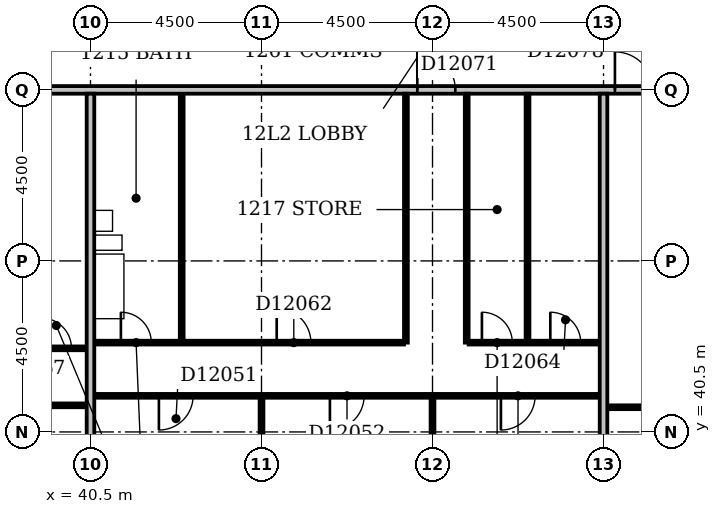
"""IFC4 building model, lengths in metres.
Left out: names, types, materials, properties, quantities, classifications, styles, units other than length and angle.
Written with IfcOpenShell. Run it as: python <this file> out.ifc"""

import sys

from ifc_helpers import new_model, si_unit, direction, frame, frame_2d, origin, place, context, subcontext, project, spatial, rectangle, extrude, element, fill, save


model = new_model("IFC4")
c1 = context("Model", 3, precision=1e-05, world=origin(), true_north=direction((0.0, 1.0)))
c2 = subcontext(c1, "Body", "Model", "MODEL_VIEW")
j1 = project(units=[si_unit("LENGTHUNIT", "METRE"), si_unit("PLANEANGLEUNIT", "RADIAN")], contexts=[c1])
p1 = place(None, origin())
s1 = spatial("IfcSite", under=j1, at=p1, CompositionType="ELEMENT")
p2 = place(p1, origin())
s2 = spatial("IfcBuilding", under=s1, at=p2, CompositionType="ELEMENT")
p3 = place(p2, frame((0.0, 0.0, 54.2)))
s3 = spatial("IfcBuildingStorey", under=s2, at=p3, CompositionType="ELEMENT", Elevation=54.2)
p4 = place(p3, frame((40.5, 36.6, 0.0), z_axis=(0.0, 0.0, 1.0), x_axis=(0.0, 1.0, 0.0)))
e1 = element("IfcWall", 1, at=p4, inside=s3, PredefinedType="PARTITIONING", context=c2, shape_type="SweptSolid", body=[
    extrude(rectangle(XDim=12.8, YDim=0.2, at=frame_2d((6.4, 0.0))), origin(), (0.0, 0.0, 1.0), 3.3),
])
p5 = place(p3, frame((45.0, 36.6, 0.0), z_axis=(0.0, 0.0, 1.0), x_axis=(0.0, 1.0, 0.0)))
e2 = element("IfcWall", 2, at=p5, inside=s3, PredefinedType="PARTITIONING", context=c2, shape_type="SweptSolid", body=[
    extrude(rectangle(XDim=4.8, YDim=0.1, at=frame_2d((2.4, 0.0))), origin(), (0.0, 0.0, 1.0), 2.6),
])
p6 = place(p3, frame((49.5, 36.6, 0.0), z_axis=(0.0, 0.0, 1.0), x_axis=(0.0, 1.0, 0.0)))
e3 = element("IfcWall", 3, at=p6, inside=s3, PredefinedType="PARTITIONING", context=c2, shape_type="SweptSolid", body=[
    extrude(rectangle(XDim=4.8, YDim=0.1, at=frame_2d((2.4, 0.0))), origin(), (0.0, 0.0, 1.0), 3.3),
])
p7 = place(p3, frame((54.0, 36.6, 0.0), z_axis=(0.0, 0.0, 1.0), x_axis=(0.0, 1.0, 0.0)))
e4 = element("IfcWall", 4, at=p7, inside=s3, PredefinedType="PARTITIONING", context=c2, shape_type="SweptSolid", body=[
    extrude(rectangle(XDim=12.8, YDim=0.2, at=frame_2d((6.4, 0.0))), origin(), (0.0, 0.0, 1.0), 2.6),
])
p8 = place(p3, frame((54.1, 41.15, 0.0), z_axis=(0.0, 0.0, 1.0), x_axis=(1.0, 0.0, 0.0)))
e5 = element("IfcWall", 5, at=p8, inside=s3, PredefinedType="PARTITIONING", context=c2, shape_type="SweptSolid", body=[
    extrude(rectangle(XDim=14.0, YDim=0.1, at=frame_2d((7.0, 0.0))), origin(), (0.0, 0.0, 1.0), 3.3),
])
p9 = place(p8, frame((1.7, 0.0, 0.0)))
e6 = element("IfcOpeningElement", 6, at=p9, cuts=e5, PredefinedType="OPENING", context=c2, shape_type="SweptSolid", body=[
    extrude(rectangle(XDim=0.9, YDim=2.1, at=frame_2d((0.45, 1.05))), frame((0.0, 0.062, 0.0), z_axis=(0.0, -1.0, 0.0), x_axis=(1.0, 0.0, 0.0)), (0.0, 0.0, 1.0), 0.124),
])
p10 = place(p8, frame((6.2, 0.0, 0.0)))
e7 = element("IfcOpeningElement", 7, at=p10, cuts=e5, PredefinedType="OPENING", context=c2, shape_type="SweptSolid", body=[
    extrude(rectangle(XDim=0.9, YDim=2.1, at=frame_2d((0.45, 1.05))), frame((0.0, 0.062, 0.0), z_axis=(0.0, -1.0, 0.0), x_axis=(1.0, 0.0, 0.0)), (0.0, 0.0, 1.0), 0.124),
])
p11 = place(p8, frame((10.7, 0.0, 0.0)))
e8 = element("IfcOpeningElement", 8, at=p11, cuts=e5, PredefinedType="OPENING", context=c2, shape_type="SweptSolid", body=[
    extrude(rectangle(XDim=0.9, YDim=2.1, at=frame_2d((0.45, 1.05))), frame((0.0, 0.062, 0.0), z_axis=(0.0, -1.0, 0.0), x_axis=(1.0, 0.0, 0.0)), (0.0, 0.0, 1.0), 0.124),
])
p12 = place(p3, frame((22.6, 41.2, 0.0), z_axis=(0.0, 0.0, 1.0), x_axis=(1.0, 0.0, 0.0)))
e9 = element("IfcWall", 9, at=p12, inside=s3, PredefinedType="PARTITIONING", context=c2, shape_type="SweptSolid", body=[
    extrude(rectangle(XDim=17.8, YDim=0.1, at=frame_2d((8.9, 0.0))), origin(), (0.0, 0.0, 1.0), 3.3),
])
p13 = place(p12, frame((1.7, 0.0, 0.0)))
e10 = element("IfcOpeningElement", 10, at=p13, cuts=e9, PredefinedType="OPENING", context=c2, shape_type="SweptSolid", body=[
    extrude(rectangle(XDim=0.9, YDim=2.1, at=frame_2d((0.45, 1.05))), frame((0.0, 0.062, 0.0), z_axis=(0.0, -1.0, 0.0), x_axis=(1.0, 0.0, 0.0)), (0.0, 0.0, 1.0), 0.124),
])
p14 = place(p12, frame((6.2, 0.0, 0.0)))
e11 = element("IfcOpeningElement", 11, at=p14, cuts=e9, PredefinedType="OPENING", context=c2, shape_type="SweptSolid", body=[
    extrude(rectangle(XDim=0.9, YDim=2.1, at=frame_2d((0.45, 1.05))), frame((0.0, 0.062, 0.0), z_axis=(0.0, -1.0, 0.0), x_axis=(1.0, 0.0, 0.0)), (0.0, 0.0, 1.0), 0.124),
])
p15 = place(p12, frame((11.85, 0.0, 0.0)))
e12 = element("IfcOpeningElement", 12, at=p15, cuts=e9, PredefinedType="OPENING", context=c2, shape_type="SweptSolid", body=[
    extrude(rectangle(XDim=0.9, YDim=2.1, at=frame_2d((0.45, 1.05))), frame((0.0, 0.062, 0.0), z_axis=(0.0, -1.0, 0.0), x_axis=(1.0, 0.0, 0.0)), (0.0, 0.0, 1.0), 0.124),
])
p16 = place(p12, frame((15.2, 0.0, 0.0)))
e13 = element("IfcOpeningElement", 13, at=p16, cuts=e9, PredefinedType="OPENING", context=c2, shape_type="SweptSolid", body=[
    extrude(rectangle(XDim=0.9, YDim=2.1, at=frame_2d((0.45, 1.05))), frame((0.0, 0.062, 0.0), z_axis=(0.0, -1.0, 0.0), x_axis=(1.0, 0.0, 0.0)), (0.0, 0.0, 1.0), 0.124),
])
p17 = place(p3, frame((40.6, 41.45, 0.0), z_axis=(0.0, 0.0, 1.0), x_axis=(1.0, 0.0, 0.0)))
e14 = element("IfcWall", 14, at=p17, inside=s3, PredefinedType="PARTITIONING", context=c2, shape_type="SweptSolid", body=[
    extrude(rectangle(XDim=13.3, YDim=0.1, at=frame_2d((6.65, 0.0))), origin(), (0.0, 0.0, 1.0), 3.3),
])
p18 = place(p17, frame((1.7, 0.0, 0.0)))
e15 = element("IfcOpeningElement", 15, at=p18, cuts=e14, PredefinedType="OPENING", context=c2, shape_type="SweptSolid", body=[
    extrude(rectangle(XDim=0.9, YDim=2.1, at=frame_2d((0.45, 1.05))), frame((0.0, 0.062, 0.0), z_axis=(0.0, -1.0, 0.0), x_axis=(1.0, 0.0, 0.0)), (0.0, 0.0, 1.0), 0.124),
])
p19 = place(p17, frame((6.2, 0.0, 0.0)))
e16 = element("IfcOpeningElement", 16, at=p19, cuts=e14, PredefinedType="OPENING", context=c2, shape_type="SweptSolid", body=[
    extrude(rectangle(XDim=0.9, YDim=2.1, at=frame_2d((0.45, 1.05))), frame((0.0, 0.062, 0.0), z_axis=(0.0, -1.0, 0.0), x_axis=(1.0, 0.0, 0.0)), (0.0, 0.0, 1.0), 0.124),
])
p20 = place(p17, frame((10.7, 0.0, 0.0)))
e17 = element("IfcOpeningElement", 17, at=p20, cuts=e14, PredefinedType="OPENING", context=c2, shape_type="SweptSolid", body=[
    extrude(rectangle(XDim=0.9, YDim=2.1, at=frame_2d((0.45, 1.05))), frame((0.0, 0.062, 0.0), z_axis=(0.0, -1.0, 0.0), x_axis=(1.0, 0.0, 0.0)), (0.0, 0.0, 1.0), 0.124),
])
p21 = place(p3, frame((26.55, 42.7, 0.0), z_axis=(0.0, 0.0, 1.0), x_axis=(1.0, 0.0, 0.0)))
e18 = element("IfcWall", 18, at=p21, inside=s3, PredefinedType="PARTITIONING", context=c2, shape_type="SweptSolid", body=[
    extrude(rectangle(XDim=13.85, YDim=0.1, at=frame_2d((6.925, 0.0))), origin(), (0.0, 0.0, 1.0), 3.3),
])
p22 = place(p21, frame((5.05, 0.0, 0.0)))
e19 = element("IfcOpeningElement", 19, at=p22, cuts=e18, PredefinedType="OPENING", context=c2, shape_type="SweptSolid", body=[
    extrude(rectangle(XDim=0.8, YDim=2.1, at=frame_2d((0.4, 1.05))), frame((0.0, 0.062, 0.0), z_axis=(0.0, -1.0, 0.0), x_axis=(1.0, 0.0, 0.0)), (0.0, 0.0, 1.0), 0.124),
])
p23 = place(p21, frame((1.7, 0.0, 0.0)))
e20 = element("IfcOpeningElement", 20, at=p23, cuts=e18, PredefinedType="OPENING", context=c2, shape_type="SweptSolid", body=[
    extrude(rectangle(XDim=0.9, YDim=2.1, at=frame_2d((0.45, 1.05))), frame((0.0, 0.062, 0.0), z_axis=(0.0, -1.0, 0.0), x_axis=(1.0, 0.0, 0.0)), (0.0, 0.0, 1.0), 0.124),
])
p24 = place(p21, frame((10.75, 0.0, 0.0)))
e21 = element("IfcOpeningElement", 21, at=p24, cuts=e18, PredefinedType="OPENING", context=c2, shape_type="SweptSolid", body=[
    extrude(rectangle(XDim=0.8, YDim=2.1, at=frame_2d((0.4, 1.05))), frame((0.0, 0.062, 0.0), z_axis=(0.0, -1.0, 0.0), x_axis=(1.0, 0.0, 0.0)), (0.0, 0.0, 1.0), 0.124),
])
p25 = place(p21, frame((6.95, 0.0, 0.0)))
e22 = element("IfcOpeningElement", 22, at=p25, cuts=e18, PredefinedType="OPENING", context=c2, shape_type="SweptSolid", body=[
    extrude(rectangle(XDim=0.8, YDim=2.1, at=frame_2d((0.4, 1.05))), frame((0.0, 0.062, 0.0), z_axis=(0.0, -1.0, 0.0), x_axis=(1.0, 0.0, 0.0)), (0.0, 0.0, 1.0), 0.124),
])
p26 = place(p21, frame((8.75, 0.0, 0.0)))
e23 = element("IfcOpeningElement", 23, at=p26, cuts=e18, PredefinedType="OPENING", context=c2, shape_type="SweptSolid", body=[
    extrude(rectangle(XDim=0.8, YDim=2.1, at=frame_2d((0.4, 1.05))), frame((0.0, 0.062, 0.0), z_axis=(0.0, -1.0, 0.0), x_axis=(1.0, 0.0, 0.0)), (0.0, 0.0, 1.0), 0.124),
])
p27 = place(p21, frame((12.65, 0.0, 0.0)))
e24 = element("IfcOpeningElement", 24, at=p27, cuts=e18, PredefinedType="OPENING", context=c2, shape_type="SweptSolid", body=[
    extrude(rectangle(XDim=0.8, YDim=2.1, at=frame_2d((0.4, 1.05))), frame((0.0, 0.062, 0.0), z_axis=(0.0, -1.0, 0.0), x_axis=(1.0, 0.0, 0.0)), (0.0, 0.0, 1.0), 0.124),
])
p28 = place(p3, frame((40.6, 42.85, 0.0), z_axis=(0.0, 0.0, 1.0), x_axis=(1.0, 0.0, 0.0)))
e25 = element("IfcWall", 25, at=p28, inside=s3, PredefinedType="PARTITIONING", context=c2, shape_type="SweptSolid", body=[
    extrude(rectangle(XDim=8.15, YDim=0.1, at=frame_2d((4.075, 0.0))), origin(), (0.0, 0.0, 1.0), 3.3),
])
p29 = place(p28, frame((0.7, 0.0, 0.0)))
e26 = element("IfcOpeningElement", 26, at=p29, cuts=e25, PredefinedType="OPENING", context=c2, shape_type="SweptSolid", body=[
    extrude(rectangle(XDim=0.8, YDim=2.1, at=frame_2d((0.4, 1.05))), frame((0.0, 0.062, 0.0), z_axis=(0.0, -1.0, 0.0), x_axis=(1.0, 0.0, 0.0)), (0.0, 0.0, 1.0), 0.124),
])
p30 = place(p28, frame((4.8, 0.0, 0.0)))
e27 = element("IfcOpeningElement", 27, at=p30, cuts=e25, PredefinedType="OPENING", context=c2, shape_type="SweptSolid", body=[
    extrude(rectangle(XDim=0.9, YDim=2.1, at=frame_2d((0.45, 1.05))), frame((0.0, 0.062, 0.0), z_axis=(0.0, -1.0, 0.0), x_axis=(1.0, 0.0, 0.0)), (0.0, 0.0, 1.0), 0.124),
])
for number, where, z_axis, x_axis in (
    (28, (48.8, 42.85, 0.0), (0.0, 0.0, 1.0), (0.0, 1.0, 0.0)),
    (29, (50.4, 42.85, 0.0), (0.0, 0.0, 1.0), (0.0, 1.0, 0.0)),
):
    element("IfcWall", number, at=place(p3, frame(where, z_axis=z_axis, x_axis=x_axis)), inside=s3, PredefinedType="PARTITIONING", context=c2, shape_type="SweptSolid", body=[
        extrude(rectangle(XDim=6.55, YDim=0.1, at=frame_2d((3.275, 0.0))), origin(), (0.0, 0.0, 1.0), 3.3),
    ])
p31 = place(p3, frame((50.45, 42.85, 0.0), z_axis=(0.0, 0.0, 1.0), x_axis=(1.0, 0.0, 0.0)))
e30 = element("IfcWall", 30, at=p31, inside=s3, PredefinedType="PARTITIONING", context=c2, shape_type="SweptSolid", body=[
    extrude(rectangle(XDim=3.45, YDim=0.1, at=frame_2d((1.725, 0.0))), origin(), (0.0, 0.0, 1.0), 3.3),
])
p32 = place(p31, frame((0.35, 0.0, 0.0)))
e31 = element("IfcOpeningElement", 31, at=p32, cuts=e30, PredefinedType="OPENING", context=c2, shape_type="SweptSolid", body=[
    extrude(rectangle(XDim=0.8, YDim=2.1, at=frame_2d((0.4, 1.05))), frame((0.0, 0.062, 0.0), z_axis=(0.0, -1.0, 0.0), x_axis=(1.0, 0.0, 0.0)), (0.0, 0.0, 1.0), 0.124),
])
p33 = place(p31, frame((2.15, 0.0, 0.0)))
e32 = element("IfcOpeningElement", 32, at=p33, cuts=e30, PredefinedType="OPENING", context=c2, shape_type="SweptSolid", body=[
    extrude(rectangle(XDim=0.8, YDim=2.1, at=frame_2d((0.4, 1.05))), frame((0.0, 0.062, 0.0), z_axis=(0.0, -1.0, 0.0), x_axis=(1.0, 0.0, 0.0)), (0.0, 0.0, 1.0), 0.124),
])
p34 = place(p3, frame((42.9, 42.9, 0.0), z_axis=(0.0, 0.0, 1.0), x_axis=(0.0, 1.0, 0.0)))
e33 = element("IfcWall", 33, at=p34, inside=s3, PredefinedType="PLUMBINGWALL", context=c2, shape_type="SweptSolid", body=[
    extrude(rectangle(XDim=6.5, YDim=0.1, at=frame_2d((3.25, 0.0))), origin(), (0.0, 0.0, 1.0), 3.3),
])
p35 = place(p3, frame((52.0, 42.9, 0.0), z_axis=(0.0, 0.0, 1.0), x_axis=(0.0, 1.0, 0.0)))
e34 = element("IfcWall", 34, at=p35, inside=s3, PredefinedType="PARTITIONING", context=c2, shape_type="SweptSolid", body=[
    extrude(rectangle(XDim=6.5, YDim=0.1, at=frame_2d((3.25, 0.0))), origin(), (0.0, 0.0, 1.0), 3.3),
])
p36 = place(p3, frame((9.1, 49.5, 0.0), z_axis=(0.0, 0.0, 1.0), x_axis=(1.0, 0.0, 0.0)))
e35 = element("IfcWall", 35, at=p36, inside=s3, PredefinedType="PARTITIONING", context=c2, shape_type="SweptSolid", body=[
    extrude(rectangle(XDim=57.8, YDim=0.2, at=frame_2d((28.9, 0.0))), origin(), (0.0, 0.0, 1.0), 3.3),
])
p37 = place(p36, frame((16.1, 0.0, 0.0)))
e36 = element("IfcOpeningElement", 36, at=p37, cuts=e35, PredefinedType="OPENING", context=c2, shape_type="SweptSolid", body=[
    extrude(rectangle(XDim=1.0, YDim=2.1, at=frame_2d((0.5, 1.05))), frame((0.0, 0.112, 0.0), z_axis=(0.0, -1.0, 0.0), x_axis=(1.0, 0.0, 0.0)), (0.0, 0.0, 1.0), 0.224),
])
p38 = place(p36, frame((40.0, 0.0, 0.0)))
e37 = element("IfcOpeningElement", 37, at=p38, cuts=e35, PredefinedType="OPENING", context=c2, shape_type="SweptSolid", body=[
    extrude(rectangle(XDim=1.0, YDim=2.1, at=frame_2d((0.5, 1.05))), frame((0.0, 0.112, 0.0), z_axis=(0.0, -1.0, 0.0), x_axis=(1.0, 0.0, 0.0)), (0.0, 0.0, 1.0), 0.224),
])
p39 = place(p36, frame((45.2, 0.0, 0.0)))
e38 = element("IfcOpeningElement", 38, at=p39, cuts=e35, PredefinedType="OPENING", context=c2, shape_type="SweptSolid", body=[
    extrude(rectangle(XDim=1.0, YDim=2.1, at=frame_2d((0.5, 1.05))), frame((0.0, 0.112, 0.0), z_axis=(0.0, -1.0, 0.0), x_axis=(1.0, 0.0, 0.0)), (0.0, 0.0, 1.0), 0.224),
])
p40 = place(p36, frame((3.9, 0.0, 0.0)))
e39 = element("IfcOpeningElement", 39, at=p40, cuts=e35, PredefinedType="OPENING", context=c2, shape_type="SweptSolid", body=[
    extrude(rectangle(XDim=0.9, YDim=2.1, at=frame_2d((0.45, 1.05))), frame((0.0, 0.112, 0.0), z_axis=(0.0, -1.0, 0.0), x_axis=(1.0, 0.0, 0.0)), (0.0, 0.0, 1.0), 0.224),
])
p41 = place(p18, frame((0.9, 0.0, 0.0), z_axis=(0.0, 0.0, 1.0), x_axis=(-1.0, 0.0, 0.0)))
e40 = element("IfcDoor", 40, at=p41, inside=s3, OperationType="SINGLE_SWING_RIGHT", PredefinedType="DOOR", context=c2, shape_type="SweptSolid", body=[
    extrude(rectangle(XDim=0.9, YDim=2.1, at=frame_2d((0.45, 1.05))), frame((0.0, 0.025, 0.0), z_axis=(0.0, -1.0, 0.0), x_axis=(1.0, 0.0, 0.0)), (0.0, 0.0, 1.0), 0.05),
])
fill(e15, e40)
p42 = place(p19, frame((0.9, 0.0, 0.0), z_axis=(0.0, 0.0, 1.0), x_axis=(-1.0, 0.0, 0.0)))
e41 = element("IfcDoor", 41, at=p42, inside=s3, OperationType="SINGLE_SWING_RIGHT", PredefinedType="DOOR", context=c2, shape_type="SweptSolid", body=[
    extrude(rectangle(XDim=0.9, YDim=2.1, at=frame_2d((0.45, 1.05))), frame((0.0, 0.025, 0.0), z_axis=(0.0, -1.0, 0.0), x_axis=(1.0, 0.0, 0.0)), (0.0, 0.0, 1.0), 0.05),
])
fill(e16, e41)
p43 = place(p20, frame((0.9, 0.0, 0.0), z_axis=(0.0, 0.0, 1.0), x_axis=(-1.0, 0.0, 0.0)))
e42 = element("IfcDoor", 42, at=p43, inside=s3, OperationType="SINGLE_SWING_RIGHT", PredefinedType="DOOR", context=c2, shape_type="SweptSolid", body=[
    extrude(rectangle(XDim=0.9, YDim=2.1, at=frame_2d((0.45, 1.05))), frame((0.0, 0.025, 0.0), z_axis=(0.0, -1.0, 0.0), x_axis=(1.0, 0.0, 0.0)), (0.0, 0.0, 1.0), 0.05),
])
fill(e17, e42)
p44 = place(p27, origin())
e43 = element("IfcDoor", 43, at=p44, inside=s3, OperationType="SINGLE_SWING_LEFT", PredefinedType="DOOR", context=c2, shape_type="SweptSolid", body=[
    extrude(rectangle(XDim=0.8, YDim=2.1, at=frame_2d((0.4, 1.05))), frame((0.0, 0.025, 0.0), z_axis=(0.0, -1.0, 0.0), x_axis=(1.0, 0.0, 0.0)), (0.0, 0.0, 1.0), 0.05),
])
fill(e24, e43)
p45 = place(p29, origin())
e44 = element("IfcDoor", 44, at=p45, inside=s3, OperationType="SINGLE_SWING_LEFT", PredefinedType="DOOR", context=c2, shape_type="SweptSolid", body=[
    extrude(rectangle(XDim=0.8, YDim=2.1, at=frame_2d((0.4, 1.05))), frame((0.0, 0.025, 0.0), z_axis=(0.0, -1.0, 0.0), x_axis=(1.0, 0.0, 0.0)), (0.0, 0.0, 1.0), 0.05),
])
fill(e26, e44)
p46 = place(p30, origin())
e45 = element("IfcDoor", 45, at=p46, inside=s3, OperationType="SINGLE_SWING_LEFT", PredefinedType="DOOR", context=c2, shape_type="SweptSolid", body=[
    extrude(rectangle(XDim=0.9, YDim=2.1, at=frame_2d((0.45, 1.05))), frame((0.0, 0.025, 0.0), z_axis=(0.0, -1.0, 0.0), x_axis=(1.0, 0.0, 0.0)), (0.0, 0.0, 1.0), 0.05),
])
fill(e27, e45)
p47 = place(p32, origin())
e46 = element("IfcDoor", 46, at=p47, inside=s3, OperationType="SINGLE_SWING_LEFT", PredefinedType="DOOR", context=c2, shape_type="SweptSolid", body=[
    extrude(rectangle(XDim=0.8, YDim=2.1, at=frame_2d((0.4, 1.05))), frame((0.0, 0.025, 0.0), z_axis=(0.0, -1.0, 0.0), x_axis=(1.0, 0.0, 0.0)), (0.0, 0.0, 1.0), 0.05),
])
fill(e31, e46)
p48 = place(p33, origin())
e47 = element("IfcDoor", 47, at=p48, inside=s3, OperationType="SINGLE_SWING_LEFT", PredefinedType="DOOR", context=c2, shape_type="SweptSolid", body=[
    extrude(rectangle(XDim=0.8, YDim=2.1, at=frame_2d((0.4, 1.05))), frame((0.0, 0.025, 0.0), z_axis=(0.0, -1.0, 0.0), x_axis=(1.0, 0.0, 0.0)), (0.0, 0.0, 1.0), 0.05),
])
fill(e32, e47)
p49 = place(p38, origin())
e48 = element("IfcDoor", 48, at=p49, inside=s3, OperationType="SINGLE_SWING_LEFT", PredefinedType="DOOR", context=c2, shape_type="SweptSolid", body=[
    extrude(rectangle(XDim=1.0, YDim=2.1, at=frame_2d((0.5, 1.05))), frame((0.0, 0.025, 0.0), z_axis=(0.0, -1.0, 0.0), x_axis=(1.0, 0.0, 0.0)), (0.0, 0.0, 1.0), 0.05),
])
fill(e37, e48)
p50 = place(p39, origin())
e49 = element("IfcDoor", 49, at=p50, inside=s3, OperationType="SINGLE_SWING_LEFT", PredefinedType="DOOR", context=c2, shape_type="SweptSolid", body=[
    extrude(rectangle(XDim=1.0, YDim=2.1, at=frame_2d((0.5, 1.05))), frame((0.0, 0.025, 0.0), z_axis=(0.0, -1.0, 0.0), x_axis=(1.0, 0.0, 0.0)), (0.0, 0.0, 1.0), 0.05),
])
fill(e38, e49)
save(model, sys.argv[1])
